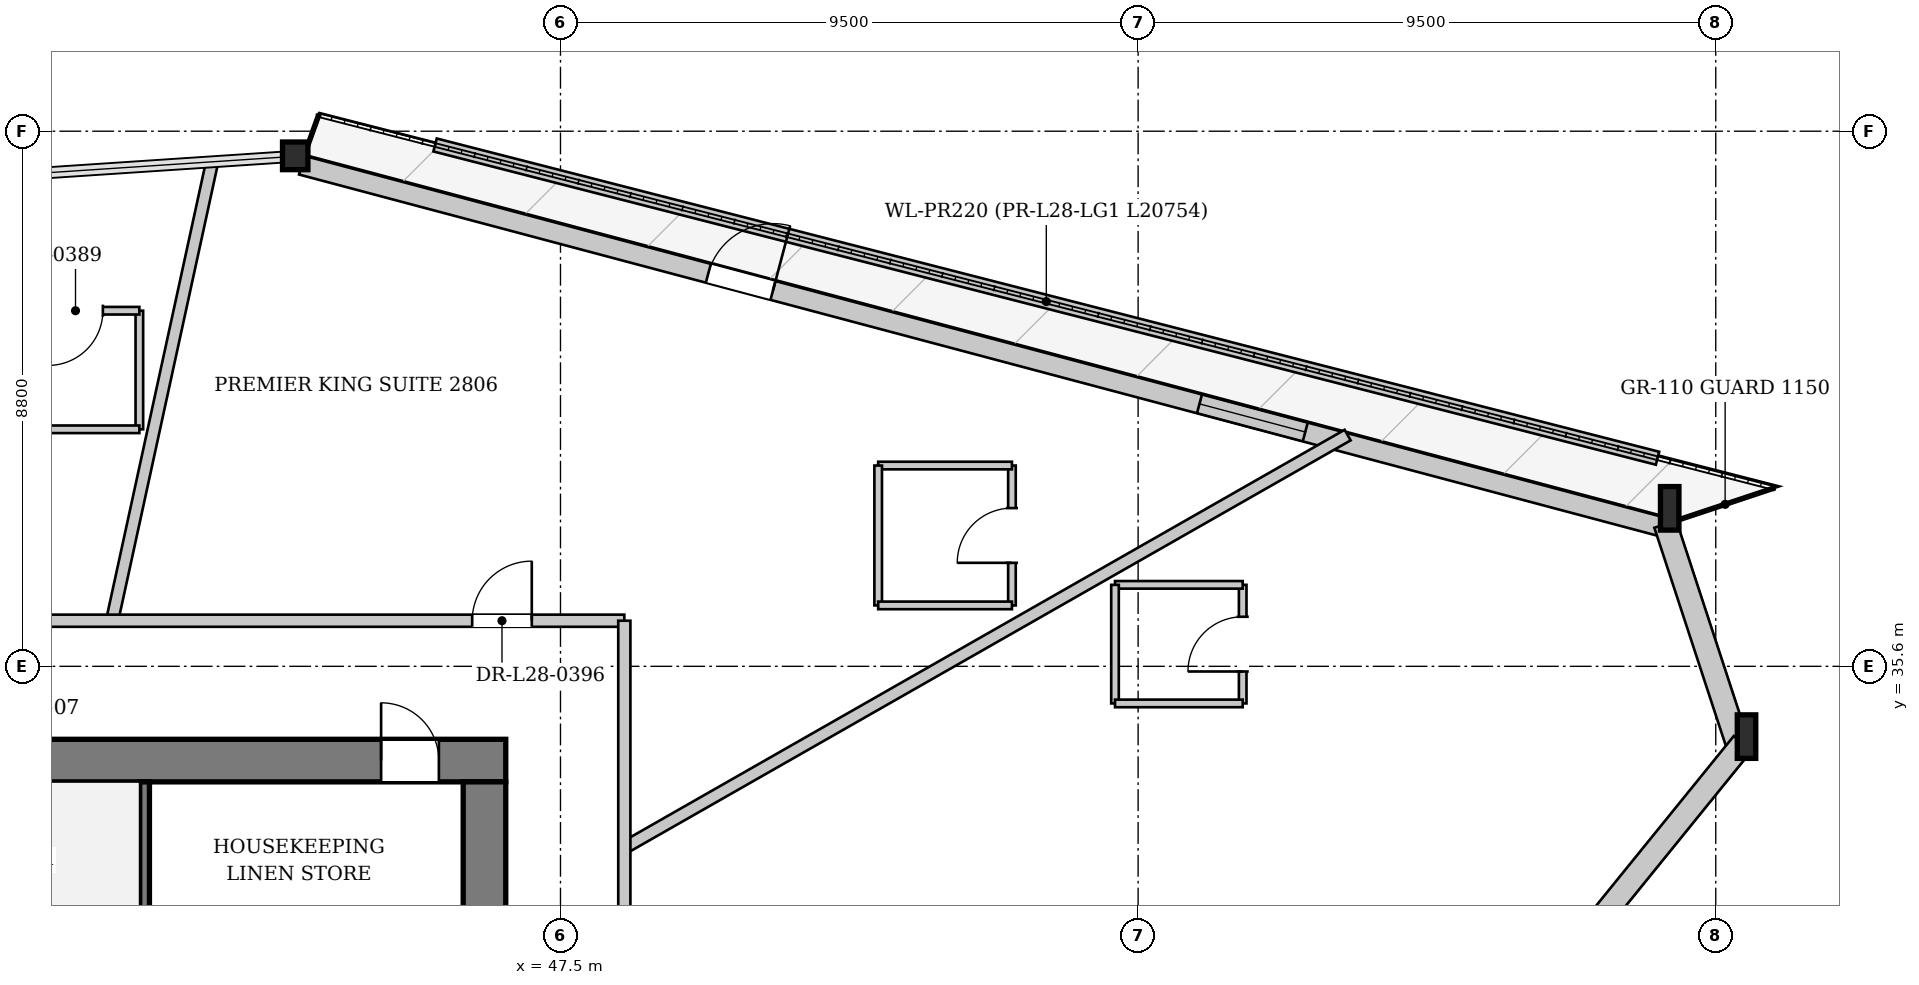
"""IFC4 building model, lengths in metres.
Left out: names, types, materials, properties, quantities, classifications, styles, units other than length and angle.
Written with IfcOpenShell. Run it as: python <this file> out.ifc"""

import sys

from ifc_helpers import new_model, si_unit, direction, frame, frame_2d, origin, origin_2d, place, context, subcontext, project, spatial, rectangle, i_section, extrude, source, transform, mapped, element, fill, save


model = new_model("IFC4")
c1 = context("Model", 3, precision=1e-05, world=origin(), true_north=direction((0.0, 1.0)))
c2 = subcontext(c1, "Body", "Model", "MODEL_VIEW")
j1 = project(units=[si_unit("LENGTHUNIT", "METRE"), si_unit("PLANEANGLEUNIT", "RADIAN")], contexts=[c1])
p1 = place(None, origin())
s1 = spatial("IfcSite", under=j1, at=p1, CompositionType="ELEMENT")
p2 = place(p1, origin())
s2 = spatial("IfcBuilding", under=s1, at=p2, CompositionType="ELEMENT")
p3 = place(p2, frame((0.0, 0.0, 109.25)))
s3 = spatial("IfcBuildingStorey", under=s2, at=p3, CompositionType="ELEMENT", Elevation=109.25)
m1 = source(origin(), c2, "Body", "SweptSolid", [
    extrude(i_section(OverallWidth=0.304, OverallDepth=0.716, WebThickness=0.021, FlangeThickness=0.04, at=origin_2d()), origin(), (0.0, 0.0, 1.0), 3.42),
])
p4 = place(p3, frame((67.092, 34.214, 0.0), z_axis=(-0.050037258281, 0.134265453391, 0.989681292543), x_axis=(-0.937043763109, -0.349211949994, 0.0)))
e1 = element("IfcColumn", 1, at=p4, inside=s3, PredefinedType="COLUMN", context=c2, shape_type="MappedRepresentation", body=[
    mapped(m1, transform((0.0, 0.0, 0.0), x_axis=(1.0, 0.0, 0.0), y_axis=(0.0, 1.0, 0.0), z_axis=(0.0, 0.0, 1.0), scale=1.0)),
])
m2 = source(origin(), c2, "Body", "SweptSolid", [
    extrude(i_section(OverallWidth=0.304, OverallDepth=0.716, WebThickness=0.021, FlangeThickness=0.04, at=origin_2d()), origin(), (0.0, 0.0, 1.0), 3.416),
])
p5 = place(p3, frame((65.852, 37.997, 0.0), z_axis=(-0.063752842961, 0.118071408712, 0.990956465976), x_axis=(-0.879923212228, -0.47511592331, 0.0)))
e2 = element("IfcColumn", 2, at=p5, inside=s3, PredefinedType="COLUMN", context=c2, shape_type="MappedRepresentation", body=[
    mapped(m2, transform((0.0, 0.0, 0.0), x_axis=(1.0, 0.0, 0.0), y_axis=(0.0, 1.0, 0.0), z_axis=(0.0, 0.0, 1.0), scale=1.0)),
])
m3 = source(origin(), c2, "Body", "SweptSolid", [
    extrude(i_section(OverallWidth=0.418, OverallDepth=0.455, WebThickness=0.038, FlangeThickness=0.059, at=origin_2d()), origin(), (0.0, 0.0, 1.0), 3.397),
])
p6 = place(p3, frame((43.282, 43.997, 0.0), z_axis=(-0.085299167136, -0.001221639293, 0.996354635501), x_axis=(0.014320351133, -0.999897458514, 0.0)))
e3 = element("IfcColumn", 3, at=p6, inside=s3, PredefinedType="COLUMN", context=c2, shape_type="MappedRepresentation", body=[
    mapped(m3, transform((0.0, 0.0, 0.0), x_axis=(1.0, 0.0, 0.0), y_axis=(0.0, 1.0, 0.0), z_axis=(0.0, 0.0, 1.0), scale=1.0)),
])
p7 = place(p3, frame((43.241, 43.843, 0.0), z_axis=(0.0, 0.0, 1.0), x_axis=(0.966426577456, -0.256942932161, 0.0)))
e4 = element("IfcWall", 4, at=p7, inside=s3, PredefinedType="SOLIDWALL", context=c2, shape_type="SweptSolid", body=[
    extrude(rectangle(XDim=23.353, YDim=0.32, at=frame_2d((11.677, 0.0))), origin(), (0.0, 0.0, 1.0), 2.692),
])
p8 = place(p7, frame((6.923, 0.0, 0.0)))
e5 = element("IfcOpeningElement", 5, at=p8, cuts=e4, PredefinedType="OPENING", context=c2, shape_type="SweptSolid", body=[
    extrude(rectangle(XDim=1.1, YDim=2.3, at=frame_2d((0.55, 1.15))), frame((0.0, 0.17, 0.0), z_axis=(0.0, -1.0, 0.0), x_axis=(1.0, 0.0, 0.0)), (0.0, 0.0, 1.0), 0.34),
])
p9 = place(p7, frame((15.281, 0.0, 0.372)))
e6 = element("IfcOpeningElement", 6, at=p9, cuts=e4, PredefinedType="OPENING", context=c2, shape_type="SweptSolid", body=[
    extrude(rectangle(XDim=1.8, YDim=2.2, at=frame_2d((0.9, 1.1))), frame((0.0, 0.17, 0.0), z_axis=(0.0, -1.0, 0.0), x_axis=(1.0, 0.0, 0.0)), (0.0, 0.0, 1.0), 0.34),
])
p10 = place(p3, frame((65.671, 37.938, 0.0), z_axis=(0.0, 0.0, 1.0), x_axis=(0.311531602634, -0.950235792086, 0.0)))
e7 = element("IfcWall", 7, at=p10, inside=s3, PredefinedType="SOLIDWALL", context=c2, shape_type="SweptSolid", body=[
    extrude(rectangle(XDim=3.98, YDim=0.38, at=frame_2d((1.99, 0.0))), origin(), (0.0, 0.0, 1.0), 2.692),
])
p11 = place(p3, frame((66.944, 34.334, 0.0), z_axis=(0.0, 0.0, 1.0), x_axis=(-0.629923947576, -0.776656822715, 0.0)))
e8 = element("IfcWall", 8, at=p11, inside=s3, PredefinedType="SOLIDWALL", context=c2, shape_type="SweptSolid", body=[
    extrude(rectangle(XDim=23.953, YDim=0.38, at=frame_2d((11.976, 0.0))), origin(), (0.0, 0.0, 1.0), 2.692),
])
p12 = place(p11, frame((5.607, 0.0, 0.322)))
e9 = element("IfcOpeningElement", 9, at=p12, cuts=e8, PredefinedType="OPENING", context=c2, shape_type="SweptSolid", body=[
    extrude(rectangle(XDim=2.2, YDim=2.25, at=frame_2d((1.1, 1.125))), frame((0.0, 0.2, 0.0), z_axis=(0.0, -1.0, 0.0), x_axis=(1.0, 0.0, 0.0)), (0.0, 0.0, 1.0), 0.4),
])
p13 = place(p11, frame((16.146, 0.0, 0.322)))
e10 = element("IfcOpeningElement", 10, at=p13, cuts=e8, PredefinedType="OPENING", context=c2, shape_type="SweptSolid", body=[
    extrude(rectangle(XDim=2.2, YDim=2.25, at=frame_2d((1.1, 1.125))), frame((0.0, 0.2, 0.0), z_axis=(0.0, -1.0, 0.0), x_axis=(1.0, 0.0, 0.0)), (0.0, 0.0, 1.0), 0.4),
])
p14 = place(p3, frame((65.542, 39.022, 0.0), z_axis=(0.0, 0.0, 1.0), x_axis=(-0.968702389273, 0.248225061217, 0.0)))
e11 = element("IfcWall", 11, at=p14, inside=s3, PredefinedType="PARAPET", context=c2, shape_type="SweptSolid", body=[
    extrude(rectangle(XDim=20.754, YDim=0.22, at=frame_2d((10.377, 0.0))), origin(), (0.0, 0.0, 1.0), 0.3),
])
p15 = place(p3, frame((29.4, 34.05, 0.0), z_axis=(0.0, 0.0, 1.0), x_axis=(1.0, 0.0, 0.0)))
e12 = element("IfcWall", 12, at=p15, inside=s3, PredefinedType="SHEAR", context=c2, shape_type="SweptSolid", body=[
    extrude(rectangle(XDim=17.2, YDim=0.7, at=frame_2d((8.6, 0.0))), origin(), (0.0, 0.0, 1.0), 3.3),
])
p16 = place(p15, frame((1.7, 0.0, 0.0)))
e13 = element("IfcOpeningElement", 13, at=p16, cuts=e12, PredefinedType="OPENING", context=c2, shape_type="SweptSolid", body=[
    extrude(rectangle(XDim=0.95, YDim=2.1, at=frame_2d((0.475, 1.05))), frame((0.0, 0.36, 0.0), z_axis=(0.0, -1.0, 0.0), x_axis=(1.0, 0.0, 0.0)), (0.0, 0.0, 1.0), 0.72),
])
p17 = place(p15, frame((4.08, 0.0, 0.0)))
e14 = element("IfcOpeningElement", 14, at=p17, cuts=e12, PredefinedType="OPENING", context=c2, shape_type="SweptSolid", body=[
    extrude(rectangle(XDim=1.32, YDim=2.2, at=frame_2d((0.66, 1.1))), frame((0.0, 0.36, 0.0), z_axis=(0.0, -1.0, 0.0), x_axis=(1.0, 0.0, 0.0)), (0.0, 0.0, 1.0), 0.72),
])
p18 = place(p15, frame((15.15, 0.0, 0.0)))
e15 = element("IfcOpeningElement", 15, at=p18, cuts=e12, PredefinedType="OPENING", context=c2, shape_type="SweptSolid", body=[
    extrude(rectangle(XDim=0.95, YDim=2.1, at=frame_2d((0.475, 1.05))), frame((0.0, 0.36, 0.0), z_axis=(0.0, -1.0, 0.0), x_axis=(1.0, 0.0, 0.0)), (0.0, 0.0, 1.0), 0.72),
])
p19 = place(p3, frame((46.25, 33.7, 0.0), z_axis=(0.0, 0.0, 1.0), x_axis=(0.0, -1.0, 0.0)))
e16 = element("IfcWall", 16, at=p19, inside=s3, PredefinedType="SHEAR", context=c2, shape_type="SweptSolid", body=[
    extrude(rectangle(XDim=14.2, YDim=0.7, at=frame_2d((7.1, 0.0))), origin(), (0.0, 0.0, 1.0), 3.3),
])
p20 = place(p19, frame((5.18, 0.0, 0.0)))
e17 = element("IfcOpeningElement", 17, at=p20, cuts=e16, PredefinedType="OPENING", context=c2, shape_type="SweptSolid", body=[
    extrude(rectangle(XDim=1.6, YDim=2.2, at=frame_2d((0.8, 1.1))), frame((0.0, 0.36, 0.0), z_axis=(0.0, -1.0, 0.0), x_axis=(1.0, 0.0, 0.0)), (0.0, 0.0, 1.0), 0.72),
])
p21 = place(p3, frame((40.66, 30.6, 0.0), z_axis=(0.0, 0.0, 1.0), x_axis=(0.0, 1.0, 0.0)))
e18 = element("IfcWall", 18, at=p21, inside=s3, PredefinedType="PARTITIONING", context=c2, shape_type="SweptSolid", body=[
    extrude(rectangle(XDim=3.1, YDim=0.16, at=frame_2d((1.55, 0.0))), origin(), (0.0, 0.0, 1.0), 3.3),
])
p22 = place(p3, frame((48.55, 32.618, 0.0), z_axis=(0.0, 0.0, 1.0), x_axis=(0.868633427324, 0.495455314771, 0.0)))
e19 = element("IfcWall", 19, at=p22, inside=s3, PredefinedType="PARTITIONING", context=c2, shape_type="SweptSolid", body=[
    extrude(rectangle(XDim=13.695, YDim=0.2, at=frame_2d((6.847, 0.0))), origin(), (0.0, 0.0, 1.0), 3.3),
])
p23 = place(p3, frame((40.126, 36.35, 0.0), z_axis=(0.0, 0.0, 1.0), x_axis=(0.213047548257, 0.97704183236, 0.0)))
e20 = element("IfcWall", 20, at=p23, inside=s3, PredefinedType="PARTITIONING", context=c2, shape_type="SweptSolid", body=[
    extrude(rectangle(XDim=7.693, YDim=0.2, at=frame_2d((3.846, 0.0))), origin(), (0.0, 0.0, 1.0), 3.3),
])
p24 = place(p3, frame((58.72, 34.99, 0.0), z_axis=(0.0, 0.0, 1.0), x_axis=(0.0, 1.0, 0.0)))
e21 = element("IfcWall", 21, at=p24, inside=s3, PredefinedType="PARTITIONING", context=c2, shape_type="SweptSolid", body=[
    extrude(rectangle(XDim=1.95, YDim=0.125, at=frame_2d((0.975, 0.0))), origin(), (0.0, 0.0, 1.0), 3.3),
])
p25 = place(p24, frame((0.525, 0.0, 0.0)))
e22 = element("IfcOpeningElement", 22, at=p25, cuts=e21, PredefinedType="OPENING", context=c2, shape_type="SweptSolid", body=[
    extrude(rectangle(XDim=0.9, YDim=2.1, at=frame_2d((0.45, 1.05))), frame((0.0, 0.073, 0.0), z_axis=(0.0, -1.0, 0.0), x_axis=(1.0, 0.0, 0.0)), (0.0, 0.0, 1.0), 0.145),
])
p26 = place(p3, frame((58.72, 36.94, 0.0), z_axis=(0.0, 0.0, 1.0), x_axis=(-1.0, 0.0, 0.0)))
e23 = element("IfcWall", 23, at=p26, inside=s3, PredefinedType="PARTITIONING", context=c2, shape_type="SweptSolid", body=[
    extrude(rectangle(XDim=2.1, YDim=0.125, at=frame_2d((1.05, 0.0))), origin(), (0.0, 0.0, 1.0), 3.3),
])
p27 = place(p3, frame((56.62, 36.94, 0.0), z_axis=(0.0, 0.0, 1.0), x_axis=(0.0, -1.0, 0.0)))
e24 = element("IfcWall", 24, at=p27, inside=s3, PredefinedType="PARTITIONING", context=c2, shape_type="SweptSolid", body=[
    extrude(rectangle(XDim=1.95, YDim=0.125, at=frame_2d((0.975, 0.0))), origin(), (0.0, 0.0, 1.0), 3.3),
])
p28 = place(p3, frame((56.62, 34.99, 0.0), z_axis=(0.0, 0.0, 1.0), x_axis=(1.0, 0.0, 0.0)))
e25 = element("IfcWall", 25, at=p28, inside=s3, PredefinedType="PARTITIONING", context=c2, shape_type="SweptSolid", body=[
    extrude(rectangle(XDim=2.1, YDim=0.125, at=frame_2d((1.05, 0.0))), origin(), (0.0, 0.0, 1.0), 2.795),
])
p29 = place(p3, frame((54.925, 36.602, 0.0), z_axis=(0.0, 0.0, 1.0), x_axis=(0.0, 1.0, 0.0)))
e26 = element("IfcWall", 26, at=p29, inside=s3, PredefinedType="PARTITIONING", context=c2, shape_type="SweptSolid", body=[
    extrude(rectangle(XDim=2.3, YDim=0.125, at=frame_2d((1.15, 0.0))), origin(), (0.0, 0.0, 1.0), 3.3),
])
p30 = place(p29, frame((0.7, 0.0, 0.0)))
e27 = element("IfcOpeningElement", 27, at=p30, cuts=e26, PredefinedType="OPENING", context=c2, shape_type="SweptSolid", body=[
    extrude(rectangle(XDim=0.9, YDim=2.1, at=frame_2d((0.45, 1.05))), frame((0.0, 0.073, 0.0), z_axis=(0.0, -1.0, 0.0), x_axis=(1.0, 0.0, 0.0)), (0.0, 0.0, 1.0), 0.145),
])
p31 = place(p3, frame((54.925, 38.902, 0.0), z_axis=(0.0, 0.0, 1.0), x_axis=(-1.0, 0.0, 0.0)))
e28 = element("IfcWall", 28, at=p31, inside=s3, PredefinedType="PARTITIONING", context=c2, shape_type="SweptSolid", body=[
    extrude(rectangle(XDim=2.2, YDim=0.125, at=frame_2d((1.1, 0.0))), origin(), (0.0, 0.0, 1.0), 3.3),
])
p32 = place(p3, frame((52.725, 38.902, 0.0), z_axis=(0.0, 0.0, 1.0), x_axis=(0.0, -1.0, 0.0)))
e29 = element("IfcWall", 29, at=p32, inside=s3, PredefinedType="PARTITIONING", context=c2, shape_type="SweptSolid", body=[
    extrude(rectangle(XDim=2.3, YDim=0.125, at=frame_2d((1.15, 0.0))), origin(), (0.0, 0.0, 1.0), 3.3),
])
p33 = place(p3, frame((52.725, 36.602, 0.0), z_axis=(0.0, 0.0, 1.0), x_axis=(1.0, 0.0, 0.0)))
e30 = element("IfcWall", 30, at=p33, inside=s3, PredefinedType="PARTITIONING", context=c2, shape_type="SweptSolid", body=[
    extrude(rectangle(XDim=2.2, YDim=0.125, at=frame_2d((1.1, 0.0))), origin(), (0.0, 0.0, 1.0), 2.985),
])
p34 = place(p3, frame((40.574, 39.498, 0.0), z_axis=(0.0, 0.0, 1.0), x_axis=(0.0, 1.0, 0.0)))
e31 = element("IfcWall", 31, at=p34, inside=s3, PredefinedType="PARTITIONING", context=c2, shape_type="SweptSolid", body=[
    extrude(rectangle(XDim=1.95, YDim=0.125, at=frame_2d((0.975, 0.0))), origin(), (0.0, 0.0, 1.0), 3.3),
])
p35 = place(p3, frame((40.574, 41.448, 0.0), z_axis=(0.0, 0.0, 1.0), x_axis=(-1.0, 0.0, 0.0)))
e32 = element("IfcWall", 32, at=p35, inside=s3, PredefinedType="PARTITIONING", context=c2, shape_type="SweptSolid", body=[
    extrude(rectangle(XDim=2.1, YDim=0.125, at=frame_2d((1.05, 0.0))), origin(), (0.0, 0.0, 1.0), 3.3),
])
p36 = place(p35, frame((0.6, 0.0, 0.0)))
e33 = element("IfcOpeningElement", 33, at=p36, cuts=e32, PredefinedType="OPENING", context=c2, shape_type="SweptSolid", body=[
    extrude(rectangle(XDim=0.9, YDim=2.1, at=frame_2d((0.45, 1.05))), frame((0.0, 0.073, 0.0), z_axis=(0.0, -1.0, 0.0), x_axis=(1.0, 0.0, 0.0)), (0.0, 0.0, 1.0), 0.145),
])
p37 = place(p3, frame((38.474, 39.498, 0.0), z_axis=(0.0, 0.0, 1.0), x_axis=(1.0, 0.0, 0.0)))
e34 = element("IfcWall", 34, at=p37, inside=s3, PredefinedType="PARTITIONING", context=c2, shape_type="SweptSolid", body=[
    extrude(rectangle(XDim=2.1, YDim=0.125, at=frame_2d((1.05, 0.0))), origin(), (0.0, 0.0, 1.0), 3.3),
])
p38 = place(p3, frame((27.45, 36.35, 0.0), z_axis=(0.0, 0.0, 1.0), x_axis=(1.0, 0.0, 0.0)))
e35 = element("IfcWall", 35, at=p38, inside=s3, PredefinedType="PARTITIONING", context=c2, shape_type="SweptSolid", body=[
    extrude(rectangle(XDim=21.1, YDim=0.2, at=frame_2d((10.55, 0.0))), origin(), (0.0, 0.0, 1.0), 3.3),
])
p39 = place(p38, frame((18.598, 0.0, 0.0)))
e36 = element("IfcOpeningElement", 36, at=p39, cuts=e35, PredefinedType="OPENING", context=c2, shape_type="SweptSolid", body=[
    extrude(rectangle(XDim=0.98, YDim=2.15, at=frame_2d((0.49, 1.075))), frame((0.0, 0.11, 0.0), z_axis=(0.0, -1.0, 0.0), x_axis=(1.0, 0.0, 0.0)), (0.0, 0.0, 1.0), 0.22),
])
p40 = place(p38, frame((5.273, 0.0, 0.0)))
e37 = element("IfcOpeningElement", 37, at=p40, cuts=e35, PredefinedType="OPENING", context=c2, shape_type="SweptSolid", body=[
    extrude(rectangle(XDim=0.98, YDim=2.15, at=frame_2d((0.49, 1.075))), frame((0.0, 0.11, 0.0), z_axis=(0.0, -1.0, 0.0), x_axis=(1.0, 0.0, 0.0)), (0.0, 0.0, 1.0), 0.22),
])
p41 = place(p3, frame((48.55, 16.85, 0.0), z_axis=(0.0, 0.0, 1.0), x_axis=(0.0, 1.0, 0.0)))
e38 = element("IfcWall", 38, at=p41, inside=s3, PredefinedType="PARTITIONING", context=c2, shape_type="SweptSolid", body=[
    extrude(rectangle(XDim=19.5, YDim=0.2, at=frame_2d((9.75, 0.0))), origin(), (0.0, 0.0, 1.0), 3.3),
])
p42 = place(p41, frame((1.963, 0.0, 0.0)))
e39 = element("IfcOpeningElement", 39, at=p42, cuts=e38, PredefinedType="OPENING", context=c2, shape_type="SweptSolid", body=[
    extrude(rectangle(XDim=0.98, YDim=2.15, at=frame_2d((0.49, 1.075))), frame((0.0, 0.11, 0.0), z_axis=(0.0, -1.0, 0.0), x_axis=(1.0, 0.0, 0.0)), (0.0, 0.0, 1.0), 0.22),
])
p43 = place(p41, frame((11.52, 0.0, 0.0)))
e40 = element("IfcOpeningElement", 40, at=p43, cuts=e38, PredefinedType="OPENING", context=c2, shape_type="SweptSolid", body=[
    extrude(rectangle(XDim=0.98, YDim=2.15, at=frame_2d((0.49, 1.075))), frame((0.0, 0.11, 0.0), z_axis=(0.0, -1.0, 0.0), x_axis=(1.0, 0.0, 0.0)), (0.0, 0.0, 1.0), 0.22),
])
m4 = source(origin(), c2, "Body", "SweptSolid", [
    extrude(rectangle(XDim=1.1, YDim=2.3, at=frame_2d((0.55, 1.15))), frame((0.0, 0.025, 0.0), z_axis=(0.0, -1.0, 0.0), x_axis=(1.0, 0.0, 0.0)), (0.0, 0.0, 1.0), 0.05),
])
p44 = place(p8, origin())
e41 = element("IfcDoor", 41, at=p44, inside=s3, OperationType="SINGLE_SWING_RIGHT", PredefinedType="DOOR", context=c2, shape_type="MappedRepresentation", body=[
    mapped(m4, transform((0.0, 0.0, 0.0), x_axis=(1.0, 0.0, 0.0), y_axis=(0.0, 1.0, 0.0), z_axis=(0.0, 0.0, 1.0), scale=1.0)),
])
fill(e5, e41)
m5 = source(origin(), c2, "Body", "SweptSolid", [
    extrude(rectangle(XDim=1.8, YDim=2.2, at=frame_2d((0.9, 1.1))), frame((0.0, 0.03, 0.0), z_axis=(0.0, -1.0, 0.0), x_axis=(1.0, 0.0, 0.0)), (0.0, 0.0, 1.0), 0.06),
])
p45 = place(p9, origin())
e42 = element("IfcWindow", 42, at=p45, inside=s3, PartitioningType="SINGLE_PANEL", PredefinedType="WINDOW", context=c2, shape_type="MappedRepresentation", body=[
    mapped(m5, transform((0.0, 0.0, 0.0), x_axis=(1.0, 0.0, 0.0), y_axis=(0.0, 1.0, 0.0), z_axis=(0.0, 0.0, 1.0), scale=1.0)),
])
fill(e6, e42)
m6 = source(origin(), c2, "Body", "SweptSolid", [
    extrude(rectangle(XDim=0.95, YDim=2.1, at=frame_2d((0.475, 1.05))), frame((0.0, 0.025, 0.0), z_axis=(0.0, -1.0, 0.0), x_axis=(1.0, 0.0, 0.0)), (0.0, 0.0, 1.0), 0.05),
])
p46 = place(p18, origin())
e43 = element("IfcDoor", 43, at=p46, inside=s3, OperationType="SINGLE_SWING_LEFT", PredefinedType="DOOR", context=c2, shape_type="MappedRepresentation", body=[
    mapped(m6, transform((0.0, 0.0, 0.0), x_axis=(1.0, 0.0, 0.0), y_axis=(0.0, 1.0, 0.0), z_axis=(0.0, 0.0, 1.0), scale=1.0)),
])
fill(e15, e43)
m7 = source(origin(), c2, "Body", "SweptSolid", [
    extrude(rectangle(XDim=0.9, YDim=2.1, at=frame_2d((0.45, 1.05))), frame((0.0, 0.025, 0.0), z_axis=(0.0, -1.0, 0.0), x_axis=(1.0, 0.0, 0.0)), (0.0, 0.0, 1.0), 0.05),
])
p47 = place(p25, origin())
e44 = element("IfcDoor", 44, at=p47, inside=s3, OperationType="SINGLE_SWING_LEFT", PredefinedType="DOOR", context=c2, shape_type="MappedRepresentation", body=[
    mapped(m7, transform((0.0, 0.0, 0.0), x_axis=(1.0, 0.0, 0.0), y_axis=(0.0, 1.0, 0.0), z_axis=(0.0, 0.0, 1.0), scale=1.0)),
])
fill(e22, e44)
p48 = place(p30, origin())
e45 = element("IfcDoor", 45, at=p48, inside=s3, OperationType="SINGLE_SWING_LEFT", PredefinedType="DOOR", context=c2, shape_type="MappedRepresentation", body=[
    mapped(m7, transform((0.0, 0.0, 0.0), x_axis=(1.0, 0.0, 0.0), y_axis=(0.0, 1.0, 0.0), z_axis=(0.0, 0.0, 1.0), scale=1.0)),
])
fill(e27, e45)
p49 = place(p36, origin())
e46 = element("IfcDoor", 46, at=p49, inside=s3, OperationType="SINGLE_SWING_RIGHT", PredefinedType="DOOR", context=c2, shape_type="MappedRepresentation", body=[
    mapped(m7, transform((0.0, 0.0, 0.0), x_axis=(1.0, 0.0, 0.0), y_axis=(0.0, 1.0, 0.0), z_axis=(0.0, 0.0, 1.0), scale=1.0)),
])
fill(e33, e46)
m8 = source(origin(), c2, "Body", "SweptSolid", [
    extrude(rectangle(XDim=0.98, YDim=2.15, at=frame_2d((0.49, 1.075))), frame((0.0, 0.025, 0.0), z_axis=(0.0, -1.0, 0.0), x_axis=(1.0, 0.0, 0.0)), (0.0, 0.0, 1.0), 0.05),
])
p50 = place(p39, origin())
e47 = element("IfcDoor", 47, at=p50, inside=s3, OperationType="SINGLE_SWING_RIGHT", PredefinedType="DOOR", context=c2, shape_type="MappedRepresentation", body=[
    mapped(m8, transform((0.0, 0.0, 0.0), x_axis=(1.0, 0.0, 0.0), y_axis=(0.0, 1.0, 0.0), z_axis=(0.0, 0.0, 1.0), scale=1.0)),
])
fill(e36, e47)
save(model, sys.argv[1])
